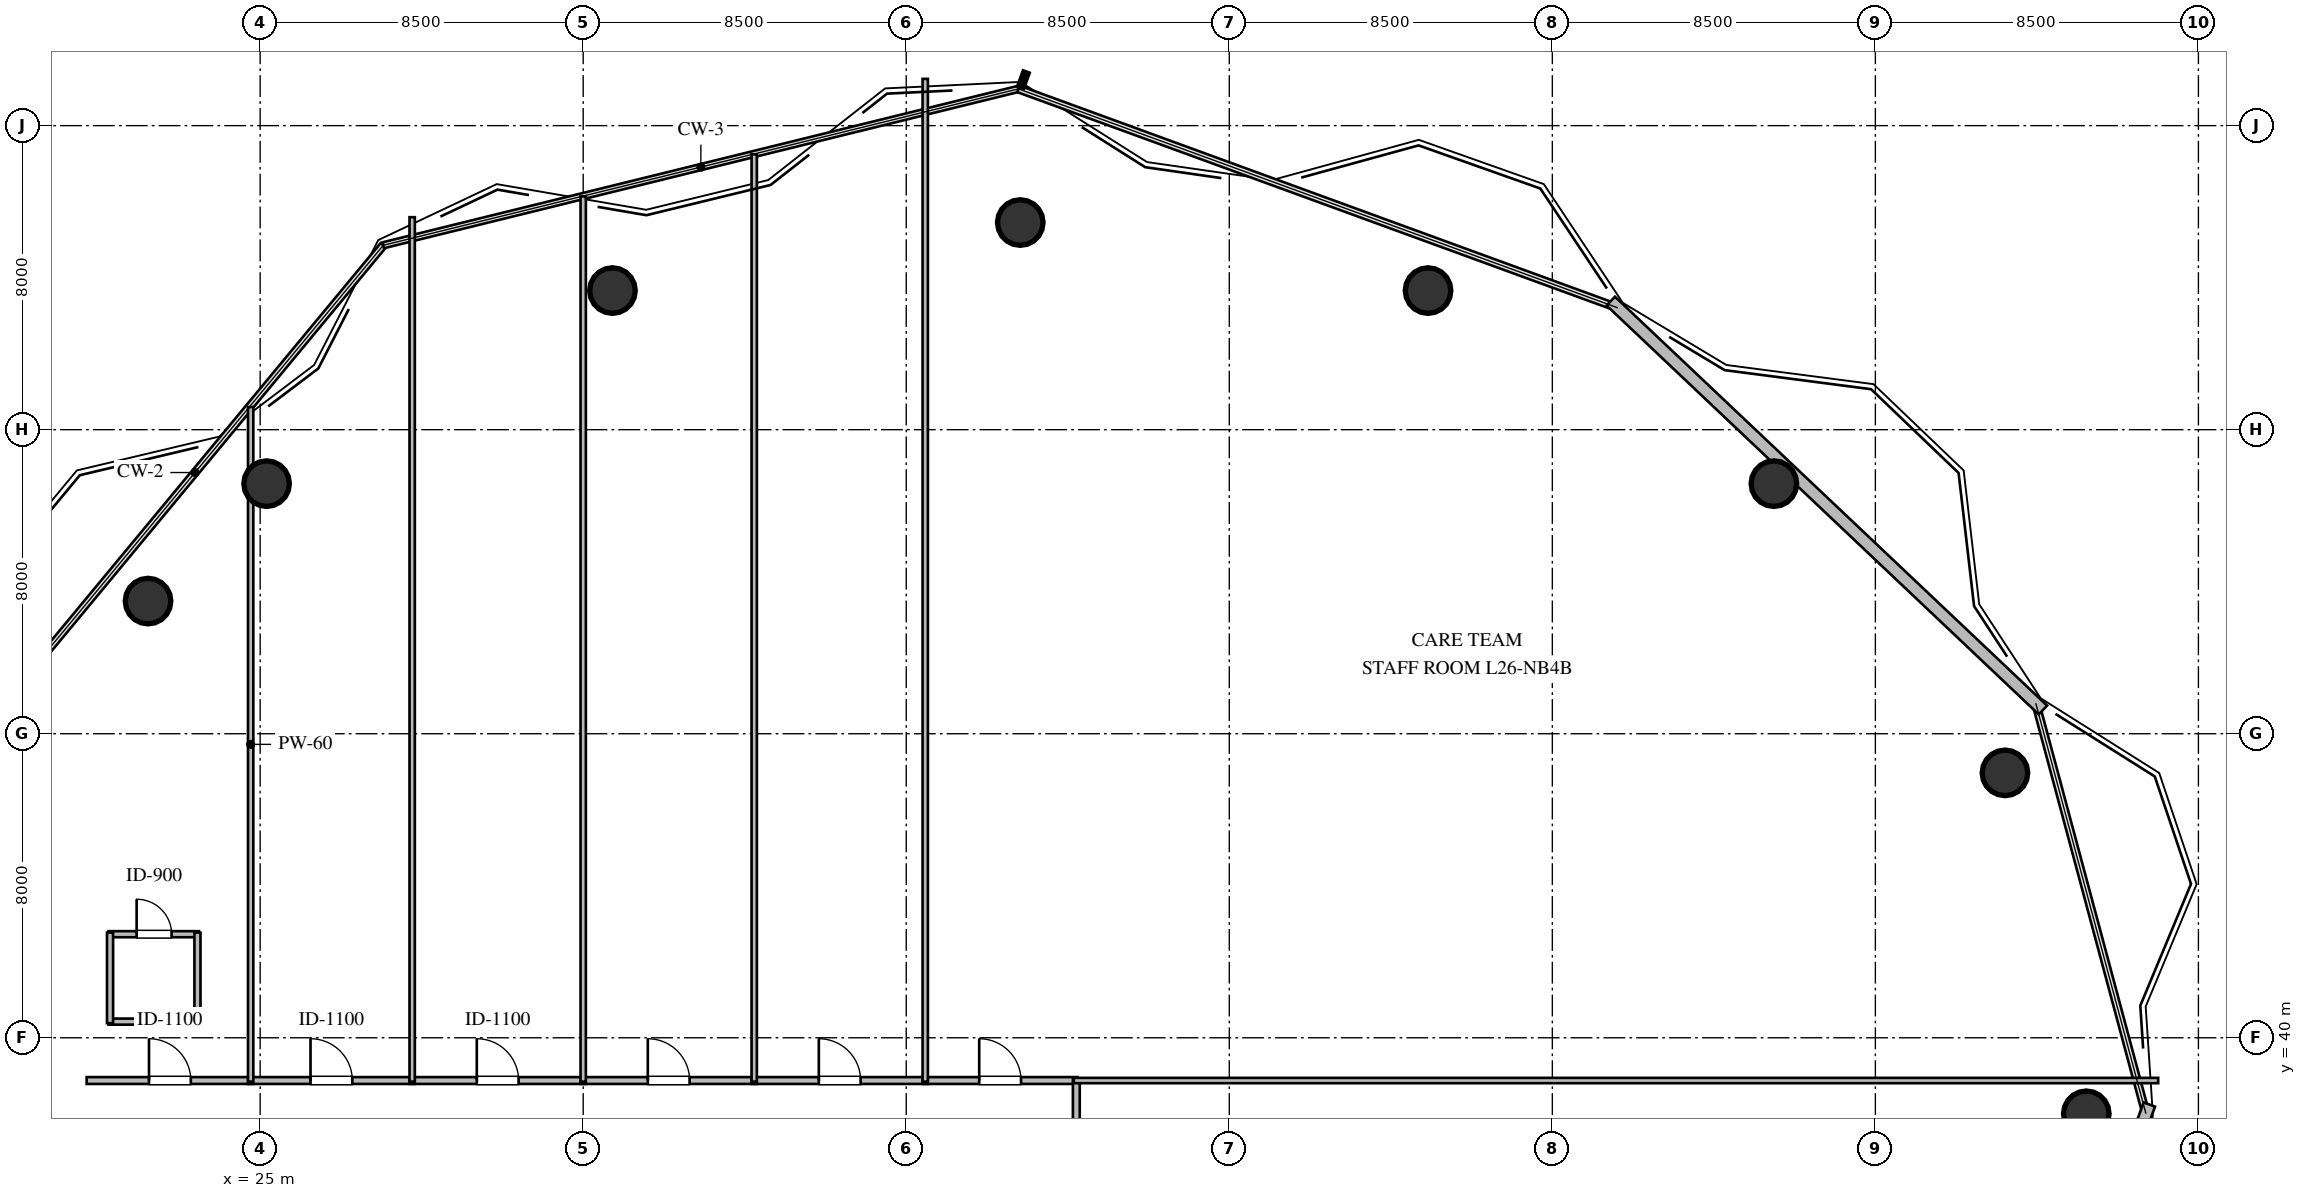
"""IFC4 building model, lengths in metres.
Left out: names, types, materials, properties, quantities, classifications, styles, units other than length and angle.
Written with IfcOpenShell. Run it as: python <this file> out.ifc"""

import sys

from ifc_helpers import new_model, si_unit, direction, frame, frame_2d, origin, origin_2d, place, context, subcontext, project, spatial, rectangle, circle, extrude, element, fill, save


model = new_model("IFC4")
c1 = context("Model", 3, precision=1e-05, world=origin(), true_north=direction((0.0, 1.0)))
c2 = subcontext(c1, "Body", "Model", "MODEL_VIEW")
j1 = project(units=[si_unit("LENGTHUNIT", "METRE"), si_unit("PLANEANGLEUNIT", "RADIAN")], contexts=[c1])
p1 = place(None, origin())
s1 = spatial("IfcSite", under=j1, at=p1, CompositionType="ELEMENT")
p2 = place(p1, origin())
s2 = spatial("IfcBuilding", under=s1, at=p2, CompositionType="ELEMENT")
p3 = place(p2, frame((0.0, 0.0, 102.6)))
s3 = spatial("IfcBuildingStorey", under=s2, at=p3, CompositionType="ELEMENT", Elevation=102.6)
for number, where, z_axis, x_axis in (
    (1, (73.05, 38.0, 0.0), (0.0, 0.0, 1.0), (1.0, 0.0, 0.0)),
    (2, (70.91, 46.97, 0.0), (0.0, 0.0, 1.0), (1.0, 0.0, 0.0)),
    (3, (64.83, 54.58, 0.0), (0.0, 0.0, 1.0), (1.0, 0.0, 0.0)),
    (4, (55.73, 59.66, 0.0), (0.0, 0.0, 1.0), (1.0, 0.0, 0.0)),
    (5, (45.0, 61.45, 0.0), (0.0, 0.0, 1.0), (1.0, 0.0, 0.0)),
    (6, (34.27, 59.66, 0.0), (0.0, 0.0, 1.0), (1.0, 0.0, 0.0)),
    (7, (25.17, 54.58, 0.0), (0.0, 0.0, 1.0), (1.0, 0.0, 0.0)),
    (8, (22.05, 51.49, 0.0), (0.0, 0.0, 1.0), (1.0, 0.0, 0.0)),
):
    element("IfcColumn", number, at=place(p3, frame(where, z_axis=z_axis, x_axis=x_axis)), inside=s3, PredefinedType="COLUMN", context=c2, shape_type="SweptSolid", body=[
        extrude(circle(Radius=0.6, at=origin_2d()), origin(), (0.0, 0.0, 1.0), 3.6),
    ])
p4 = place(p3, frame((74.708, 38.244, 0.0), z_axis=(0.0, 0.0, 1.0), x_axis=(-0.340324669139, -0.94030799187, 0.0)))
e9 = element("IfcWall", 9, at=p4, inside=s3, PredefinedType="STANDARD", context=c2, shape_type="SweptSolid", body=[
    extrude(rectangle(XDim=13.81, YDim=0.32, at=frame_2d((6.905, 0.0))), origin(), (0.0, 0.0, 1.0), 3.36),
])
p5 = place(p3, frame((60.538, 59.383, 0.0), z_axis=(0.0, 0.0, 1.0), x_axis=(0.726378346584, -0.687295058628, 0.0)))
e10 = element("IfcWall", 10, at=p5, inside=s3, PredefinedType="STANDARD", context=c2, shape_type="SweptSolid", body=[
    extrude(rectangle(XDim=15.654, YDim=0.32, at=frame_2d((7.827, 0.0))), origin(), (0.0, 0.0, 1.0), 3.36),
])
p6 = place(p3, frame((21.01, 40.425, 0.0), z_axis=(0.0, 0.0, 1.0), x_axis=(1.0, 0.0, 0.0)))
e11 = element("IfcWall", 11, at=p6, inside=s3, PredefinedType="PLUMBINGWALL", context=c2, shape_type="SweptSolid", body=[
    extrude(rectangle(XDim=2.38, YDim=0.16, at=frame_2d((1.19, 0.0))), origin(), (0.0, 0.0, 1.0), 3.36),
])
p7 = place(p3, frame((21.01, 42.725, 0.0), z_axis=(0.0, 0.0, 1.0), x_axis=(1.0, 0.0, 0.0)))
e12 = element("IfcWall", 12, at=p7, inside=s3, PredefinedType="PLUMBINGWALL", context=c2, shape_type="SweptSolid", body=[
    extrude(rectangle(XDim=2.38, YDim=0.16, at=frame_2d((1.19, 0.0))), origin(), (0.0, 0.0, 1.0), 3.36),
])
p8 = place(p7, frame((0.74, 0.0, 0.0)))
e13 = element("IfcOpeningElement", 13, at=p8, cuts=e12, PredefinedType="OPENING", context=c2, shape_type="SweptSolid", body=[
    extrude(rectangle(XDim=0.92, YDim=2.1, at=frame_2d((0.46, 1.05))), frame((0.0, 0.09, 0.0), z_axis=(0.0, -1.0, 0.0), x_axis=(1.0, 0.0, 0.0)), (0.0, 0.0, 1.0), 0.18),
])
p9 = place(p3, frame((21.05, 40.385, 0.0), z_axis=(0.0, 0.0, 1.0), x_axis=(0.0, 1.0, 0.0)))
e14 = element("IfcWall", 14, at=p9, inside=s3, PredefinedType="PLUMBINGWALL", context=c2, shape_type="SweptSolid", body=[
    extrude(rectangle(XDim=2.38, YDim=0.16, at=frame_2d((1.19, 0.0))), origin(), (0.0, 0.0, 1.0), 3.36),
])
p10 = place(p3, frame((23.35, 40.385, 0.0), z_axis=(0.0, 0.0, 1.0), x_axis=(0.0, 1.0, 0.0)))
e15 = element("IfcWall", 15, at=p10, inside=s3, PredefinedType="PLUMBINGWALL", context=c2, shape_type="SweptSolid", body=[
    extrude(rectangle(XDim=2.38, YDim=0.16, at=frame_2d((1.19, 0.0))), origin(), (0.0, 0.0, 1.0), 2.806),
])
p11 = place(p3, frame((20.435, 38.875, 0.0), z_axis=(0.0, 0.0, 1.0), x_axis=(1.0, 0.0, 0.0)))
e16 = element("IfcWall", 16, at=p11, inside=s3, PredefinedType="PARTITIONING", context=c2, shape_type="SweptSolid", body=[
    extrude(rectangle(XDim=4.38, YDim=0.18, at=frame_2d((2.19, 0.0))), origin(), (0.0, 0.0, 1.0), 3.36),
])
p12 = place(p11, frame((1.64, 0.0, 0.0)))
e17 = element("IfcOpeningElement", 17, at=p12, cuts=e16, PredefinedType="OPENING", context=c2, shape_type="SweptSolid", body=[
    extrude(rectangle(XDim=1.1, YDim=2.1, at=frame_2d((0.55, 1.05))), frame((0.0, 0.1, 0.0), z_axis=(0.0, -1.0, 0.0), x_axis=(1.0, 0.0, 0.0)), (0.0, 0.0, 1.0), 0.2),
])
p13 = place(p3, frame((24.685, 38.875, 0.0), z_axis=(0.0, 0.0, 1.0), x_axis=(1.0, 0.0, 0.0)))
e18 = element("IfcWall", 18, at=p13, inside=s3, PredefinedType="PARTITIONING", context=c2, shape_type="SweptSolid", body=[
    extrude(rectangle(XDim=4.38, YDim=0.18, at=frame_2d((2.19, 0.0))), origin(), (0.0, 0.0, 1.0), 3.36),
])
p14 = place(p13, frame((1.64, 0.0, 0.0)))
e19 = element("IfcOpeningElement", 19, at=p14, cuts=e18, PredefinedType="OPENING", context=c2, shape_type="SweptSolid", body=[
    extrude(rectangle(XDim=1.1, YDim=2.1, at=frame_2d((0.55, 1.05))), frame((0.0, 0.1, 0.0), z_axis=(0.0, -1.0, 0.0), x_axis=(1.0, 0.0, 0.0)), (0.0, 0.0, 1.0), 0.2),
])
p15 = place(p3, frame((28.935, 38.875, 0.0), z_axis=(0.0, 0.0, 1.0), x_axis=(1.0, 0.0, 0.0)))
e20 = element("IfcWall", 20, at=p15, inside=s3, PredefinedType="PARTITIONING", context=c2, shape_type="SweptSolid", body=[
    extrude(rectangle(XDim=4.63, YDim=0.18, at=frame_2d((2.315, 0.0))), origin(), (0.0, 0.0, 1.0), 3.36),
])
p16 = place(p15, frame((1.765, 0.0, 0.0)))
e21 = element("IfcOpeningElement", 21, at=p16, cuts=e20, PredefinedType="OPENING", context=c2, shape_type="SweptSolid", body=[
    extrude(rectangle(XDim=1.1, YDim=2.1, at=frame_2d((0.55, 1.05))), frame((0.0, 0.1, 0.0), z_axis=(0.0, -1.0, 0.0), x_axis=(1.0, 0.0, 0.0)), (0.0, 0.0, 1.0), 0.2),
])
p17 = place(p3, frame((33.435, 38.875, 0.0), z_axis=(0.0, 0.0, 1.0), x_axis=(1.0, 0.0, 0.0)))
e22 = element("IfcWall", 22, at=p17, inside=s3, PredefinedType="PARTITIONING", context=c2, shape_type="SweptSolid", body=[
    extrude(rectangle(XDim=4.63, YDim=0.18, at=frame_2d((2.315, 0.0))), origin(), (0.0, 0.0, 1.0), 3.36),
])
p18 = place(p17, frame((1.765, 0.0, 0.0)))
e23 = element("IfcOpeningElement", 23, at=p18, cuts=e22, PredefinedType="OPENING", context=c2, shape_type="SweptSolid", body=[
    extrude(rectangle(XDim=1.1, YDim=2.1, at=frame_2d((0.55, 1.05))), frame((0.0, 0.1, 0.0), z_axis=(0.0, -1.0, 0.0), x_axis=(1.0, 0.0, 0.0)), (0.0, 0.0, 1.0), 0.2),
])
p19 = place(p3, frame((37.935, 38.875, 0.0), z_axis=(0.0, 0.0, 1.0), x_axis=(1.0, 0.0, 0.0)))
e24 = element("IfcWall", 24, at=p19, inside=s3, PredefinedType="PARTITIONING", context=c2, shape_type="SweptSolid", body=[
    extrude(rectangle(XDim=4.63, YDim=0.18, at=frame_2d((2.315, 0.0))), origin(), (0.0, 0.0, 1.0), 3.36),
])
p20 = place(p19, frame((1.765, 0.0, 0.0)))
e25 = element("IfcOpeningElement", 25, at=p20, cuts=e24, PredefinedType="OPENING", context=c2, shape_type="SweptSolid", body=[
    extrude(rectangle(XDim=1.1, YDim=2.1, at=frame_2d((0.55, 1.05))), frame((0.0, 0.1, 0.0), z_axis=(0.0, -1.0, 0.0), x_axis=(1.0, 0.0, 0.0)), (0.0, 0.0, 1.0), 0.2),
])
p21 = place(p3, frame((42.435, 38.875, 0.0), z_axis=(0.0, 0.0, 1.0), x_axis=(1.0, 0.0, 0.0)))
e26 = element("IfcWall", 26, at=p21, inside=s3, PredefinedType="PARTITIONING", context=c2, shape_type="SweptSolid", body=[
    extrude(rectangle(XDim=4.07, YDim=0.18, at=frame_2d((2.035, 0.0))), origin(), (0.0, 0.0, 1.0), 3.36),
])
p22 = place(p21, frame((1.485, 0.0, 0.0)))
e27 = element("IfcOpeningElement", 27, at=p22, cuts=e26, PredefinedType="OPENING", context=c2, shape_type="SweptSolid", body=[
    extrude(rectangle(XDim=1.1, YDim=2.1, at=frame_2d((0.55, 1.05))), frame((0.0, 0.1, 0.0), z_axis=(0.0, -1.0, 0.0), x_axis=(1.0, 0.0, 0.0)), (0.0, 0.0, 1.0), 0.2),
])
p23 = place(p3, frame((46.475, 38.905, 0.0), z_axis=(0.0, 0.0, 1.0), x_axis=(0.0, -1.0, 0.0)))
e28 = element("IfcWall", 28, at=p23, inside=s3, PredefinedType="PARTITIONING", context=c2, shape_type="SweptSolid", body=[
    extrude(rectangle(XDim=6.03, YDim=0.18, at=frame_2d((3.015, 0.0))), origin(), (0.0, 0.0, 1.0), 3.36),
])
p24 = place(p23, frame((2.465, 0.0, 0.0)))
e29 = element("IfcOpeningElement", 29, at=p24, cuts=e28, PredefinedType="OPENING", context=c2, shape_type="SweptSolid", body=[
    extrude(rectangle(XDim=1.1, YDim=2.1, at=frame_2d((0.55, 1.05))), frame((0.0, 0.1, 0.0), z_axis=(0.0, -1.0, 0.0), x_axis=(1.0, 0.0, 0.0)), (0.0, 0.0, 1.0), 0.2),
])
p25 = place(p3, frame((24.75, 56.595, 0.0), z_axis=(0.0, 0.0, 1.0), x_axis=(0.0, -1.0, 0.0)))
e30 = element("IfcWall", 30, at=p25, inside=s3, PredefinedType="PARTITIONING", context=c2, shape_type="SweptSolid", body=[
    extrude(rectangle(XDim=17.75, YDim=0.14, at=frame_2d((8.875, 0.0))), origin(), (0.0, 0.0, 1.0), 2.806),
])
p26 = place(p3, frame((29.0, 61.591, 0.0), z_axis=(0.0, 0.0, 1.0), x_axis=(0.0, -1.0, 0.0)))
e31 = element("IfcWall", 31, at=p26, inside=s3, PredefinedType="PARTITIONING", context=c2, shape_type="SweptSolid", body=[
    extrude(rectangle(XDim=22.746, YDim=0.14, at=frame_2d((11.373, 0.0))), origin(), (0.0, 0.0, 1.0), 3.36),
])
p27 = place(p3, frame((33.5, 62.137, 0.0), z_axis=(0.0, 0.0, 1.0), x_axis=(0.0, -1.0, 0.0)))
e32 = element("IfcWall", 32, at=p27, inside=s3, PredefinedType="PARTITIONING", context=c2, shape_type="SweptSolid", body=[
    extrude(rectangle(XDim=23.292, YDim=0.14, at=frame_2d((11.646, 0.0))), origin(), (0.0, 0.0, 1.0), 3.36),
])
p28 = place(p3, frame((38.0, 63.245, 0.0), z_axis=(0.0, 0.0, 1.0), x_axis=(0.0, -1.0, 0.0)))
e33 = element("IfcWall", 33, at=p28, inside=s3, PredefinedType="PARTITIONING", context=c2, shape_type="SweptSolid", body=[
    extrude(rectangle(XDim=24.4, YDim=0.14, at=frame_2d((12.2, 0.0))), origin(), (0.0, 0.0, 1.0), 3.36),
])
p29 = place(p3, frame((42.5, 65.23, 0.0), z_axis=(0.0, 0.0, 1.0), x_axis=(0.0, -1.0, 0.0)))
e34 = element("IfcWall", 34, at=p29, inside=s3, PredefinedType="PARTITIONING", context=c2, shape_type="SweptSolid", body=[
    extrude(rectangle(XDim=26.385, YDim=0.14, at=frame_2d((13.192, 0.0))), origin(), (0.0, 0.0, 1.0), 3.36),
])
p30 = place(p3, frame((74.941, 38.875, 0.0), z_axis=(0.0, 0.0, 1.0), x_axis=(-1.0, 0.0, 0.0)))
e35 = element("IfcWall", 35, at=p30, inside=s3, PredefinedType="PARTITIONING", context=c2, shape_type="SweptSolid", body=[
    extrude(rectangle(XDim=28.531, YDim=0.14, at=frame_2d((14.266, 0.0))), origin(), (0.0, 0.0, 1.0), 3.36),
])
p31 = place(p8, origin())
e36 = element("IfcDoor", 36, at=p31, inside=s3, OperationType="SINGLE_SWING_LEFT", PredefinedType="DOOR", context=c2, shape_type="SweptSolid", body=[
    extrude(rectangle(XDim=0.92, YDim=2.1, at=frame_2d((0.46, 1.05))), frame((0.0, 0.025, 0.0), z_axis=(0.0, -1.0, 0.0), x_axis=(1.0, 0.0, 0.0)), (0.0, 0.0, 1.0), 0.05),
])
fill(e13, e36)
p32 = place(p12, origin())
e37 = element("IfcDoor", 37, at=p32, inside=s3, OperationType="SINGLE_SWING_LEFT", PredefinedType="DOOR", context=c2, shape_type="SweptSolid", body=[
    extrude(rectangle(XDim=1.1, YDim=2.1, at=frame_2d((0.55, 1.05))), frame((0.0, 0.025, 0.0), z_axis=(0.0, -1.0, 0.0), x_axis=(1.0, 0.0, 0.0)), (0.0, 0.0, 1.0), 0.05),
])
fill(e17, e37)
p33 = place(p14, origin())
e38 = element("IfcDoor", 38, at=p33, inside=s3, OperationType="SINGLE_SWING_LEFT", PredefinedType="DOOR", context=c2, shape_type="SweptSolid", body=[
    extrude(rectangle(XDim=1.1, YDim=2.1, at=frame_2d((0.55, 1.05))), frame((0.0, 0.025, 0.0), z_axis=(0.0, -1.0, 0.0), x_axis=(1.0, 0.0, 0.0)), (0.0, 0.0, 1.0), 0.05),
])
fill(e19, e38)
p34 = place(p16, origin())
e39 = element("IfcDoor", 39, at=p34, inside=s3, OperationType="SINGLE_SWING_LEFT", PredefinedType="DOOR", context=c2, shape_type="SweptSolid", body=[
    extrude(rectangle(XDim=1.1, YDim=2.1, at=frame_2d((0.55, 1.05))), frame((0.0, 0.025, 0.0), z_axis=(0.0, -1.0, 0.0), x_axis=(1.0, 0.0, 0.0)), (0.0, 0.0, 1.0), 0.05),
])
fill(e21, e39)
p35 = place(p18, origin())
e40 = element("IfcDoor", 40, at=p35, inside=s3, OperationType="SINGLE_SWING_LEFT", PredefinedType="DOOR", context=c2, shape_type="SweptSolid", body=[
    extrude(rectangle(XDim=1.1, YDim=2.1, at=frame_2d((0.55, 1.05))), frame((0.0, 0.025, 0.0), z_axis=(0.0, -1.0, 0.0), x_axis=(1.0, 0.0, 0.0)), (0.0, 0.0, 1.0), 0.05),
])
fill(e23, e40)
p36 = place(p20, origin())
e41 = element("IfcDoor", 41, at=p36, inside=s3, OperationType="SINGLE_SWING_LEFT", PredefinedType="DOOR", context=c2, shape_type="SweptSolid", body=[
    extrude(rectangle(XDim=1.1, YDim=2.1, at=frame_2d((0.55, 1.05))), frame((0.0, 0.025, 0.0), z_axis=(0.0, -1.0, 0.0), x_axis=(1.0, 0.0, 0.0)), (0.0, 0.0, 1.0), 0.05),
])
fill(e25, e41)
p37 = place(p22, origin())
e42 = element("IfcDoor", 42, at=p37, inside=s3, OperationType="SINGLE_SWING_LEFT", PredefinedType="DOOR", context=c2, shape_type="SweptSolid", body=[
    extrude(rectangle(XDim=1.1, YDim=2.1, at=frame_2d((0.55, 1.05))), frame((0.0, 0.025, 0.0), z_axis=(0.0, -1.0, 0.0), x_axis=(1.0, 0.0, 0.0)), (0.0, 0.0, 1.0), 0.05),
])
fill(e27, e42)
save(model, sys.argv[1])
